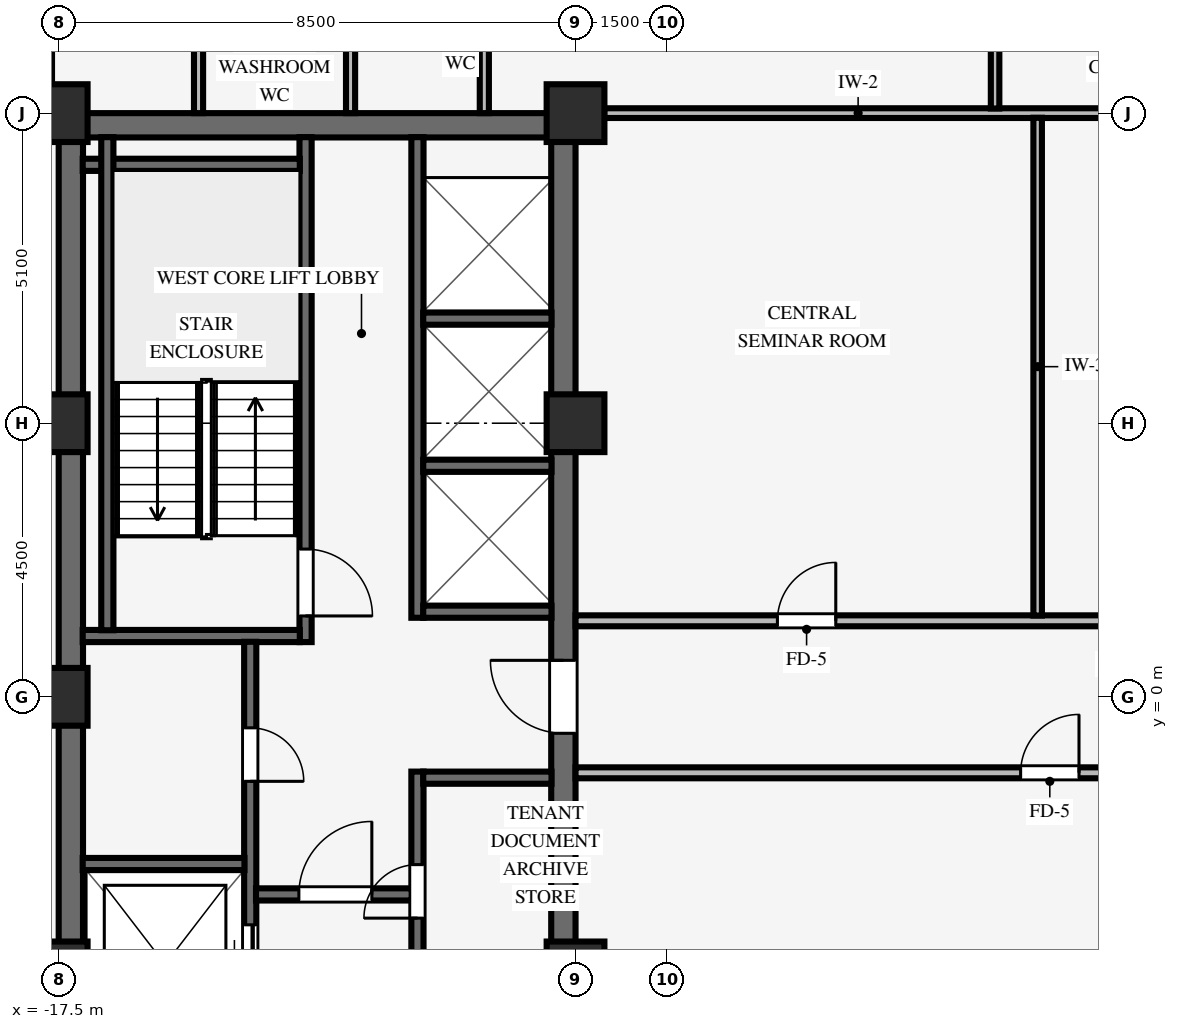
"""IFC4 building model, lengths in metres.
Left out: names, types, materials, properties, quantities, classifications, styles, units other than length and angle.
Written with IfcOpenShell. Run it as: python <this file> out.ifc"""

import sys

from ifc_helpers import new_model, si_unit, direction, frame, frame_2d, origin, origin_2d, place, context, subcontext, project, spatial, rectangle, extrude, source, transform, mapped, element, fill, save


model = new_model("IFC4")
c1 = context("Model", 3, precision=1e-05, world=origin(), true_north=direction((0.0, 1.0)))
c2 = subcontext(c1, "Body", "Model", "MODEL_VIEW")
j1 = project(units=[si_unit("LENGTHUNIT", "METRE"), si_unit("PLANEANGLEUNIT", "RADIAN")], contexts=[c1])
p1 = place(None, origin())
s1 = spatial("IfcSite", under=j1, at=p1, CompositionType="ELEMENT")
p2 = place(p1, origin())
s2 = spatial("IfcBuilding", under=s1, at=p2, CompositionType="ELEMENT")
p3 = place(p2, frame((0.0, 0.0, 160.35)))
s3 = spatial("IfcBuildingStorey", under=s2, at=p3, CompositionType="ELEMENT", Elevation=160.35)
p4 = place(p3, frame((-17.5, 9.4, 0.0), z_axis=(0.0, 0.0, 1.0), x_axis=(1.0, 0.0, 0.0)))
e1 = element("IfcWall", 1, at=p4, inside=s3, PredefinedType="SHEAR", context=c2, shape_type="SweptSolid", body=[
    extrude(rectangle(XDim=8.5, YDim=0.4, at=frame_2d((4.25, 0.0))), origin(), (0.0, 0.0, 1.0), 3.37),
])
p5 = place(p3, frame((-17.3, -9.205, 0.0), z_axis=(0.0, 0.0, 1.0), x_axis=(0.0, 1.0, 0.0)))
e2 = element("IfcWall", 2, at=p5, inside=s3, PredefinedType="SHEAR", context=c2, shape_type="SweptSolid", body=[
    extrude(rectangle(XDim=18.41, YDim=0.4, at=frame_2d((9.205, 0.0))), origin(), (0.0, 0.0, 1.0), 3.37),
])
p6 = place(p3, frame((-9.2, -9.205, 0.0), z_axis=(0.0, 0.0, 1.0), x_axis=(0.0, 1.0, 0.0)))
e3 = element("IfcWall", 3, at=p6, inside=s3, PredefinedType="SHEAR", context=c2, shape_type="SweptSolid", body=[
    extrude(rectangle(XDim=18.41, YDim=0.4, at=frame_2d((9.205, 0.0))), origin(), (0.0, 0.0, 1.0), 3.37),
])
p7 = place(p6, frame((8.605, 0.0, 0.0)))
e4 = element("IfcOpeningElement", 4, at=p7, cuts=e3, PredefinedType="OPENING", context=c2, shape_type="SweptSolid", body=[
    extrude(rectangle(XDim=1.2, YDim=2.15, at=frame_2d((0.6, 1.075))), frame((0.0, 0.21, 0.0), z_axis=(0.0, -1.0, 0.0), x_axis=(1.0, 0.0, 0.0)), (0.0, 0.0, 1.0), 0.42),
])
for number, where, z_axis, x_axis in (
    (5, (-17.5, -4.5, 0.0), (0.0, 0.0, 1.0), (1.0, 0.0, 0.0)),
    (6, (-17.5, 4.5, 0.0), (0.0, 0.0, 1.0), (1.0, 0.0, 0.0)),
    (7, (-17.5, 9.6, 0.0), (0.0, 0.0, 1.0), (1.0, 0.0, 0.0)),
    (8, (-9.0, -4.5, 0.0), (0.0, 0.0, 1.0), (1.0, 0.0, 0.0)),
    (9, (-9.0, 4.5, 0.0), (0.0, 0.0, 1.0), (1.0, 0.0, 0.0)),
    (10, (-9.0, 9.6, 0.0), (0.0, 0.0, 1.0), (1.0, 0.0, 0.0)),
    (11, (-17.5, 0.0, 0.0), (0.0, 0.0, 1.0), (1.0, 0.0, 0.0)),
):
    element("IfcColumn", number, at=place(p3, frame(where, z_axis=z_axis, x_axis=x_axis)), inside=s3, PredefinedType="COLUMN", context=c2, shape_type="SweptSolid", body=[
        extrude(rectangle(XDim=0.95, YDim=0.95, at=origin_2d()), origin(), (0.0, 0.0, 1.0), 3.37),
    ])
p8 = place(p3, frame((-13.44, 0.9, 0.0), z_axis=(0.0, 0.0, 1.0), x_axis=(0.0, 1.0, 0.0)))
e12 = element("IfcWall", 12, at=p8, inside=s3, PredefinedType="SHEAR", context=c2, shape_type="SweptSolid", body=[
    extrude(rectangle(XDim=8.305, YDim=0.2, at=frame_2d((4.153, 0.0))), origin(), (0.0, 0.0, 1.0), 3.37),
])
p9 = place(p8, frame((1.53, 0.0, 0.0), z_axis=(0.0, 0.0, 1.0), x_axis=(-1.0, 0.0, 0.0)))
e13 = element("IfcOpeningElement", 13, at=p9, cuts=e12, PredefinedType="OPENING", context=c2, shape_type="SweptSolid", body=[
    extrude(rectangle(XDim=1.1, YDim=2.15, at=frame_2d((0.55, 1.075))), frame((0.0, 0.11, 0.0), z_axis=(0.0, -1.0, 0.0), x_axis=(1.0, 0.0, 0.0)), (0.0, 0.0, 1.0), 0.22),
])
for number, where, z_axis, x_axis in (
    (14, (-17.105, 1.0, 0.0), (0.0, 0.0, 1.0), (1.0, 0.0, 0.0)),
    (15, (-17.105, 8.75, 0.0), (0.0, 0.0, 1.0), (1.0, 0.0, 0.0)),
):
    element("IfcWall", number, at=place(p3, frame(where, z_axis=z_axis, x_axis=x_axis)), inside=s3, PredefinedType="SHEAR", context=c2, shape_type="SweptSolid", body=[
        extrude(rectangle(XDim=3.57, YDim=0.2, at=frame_2d((1.785, 0.0))), origin(), (0.0, 0.0, 1.0), 3.37),
    ])
p10 = place(p3, frame((-16.7, 1.095, 0.0), z_axis=(0.0, 0.0, 1.0), x_axis=(0.0, 1.0, 0.0)))
e16 = element("IfcWall", 16, at=p10, inside=s3, PredefinedType="SHEAR", context=c2, shape_type="SweptSolid", body=[
    extrude(rectangle(XDim=8.11, YDim=0.2, at=frame_2d((4.055, 0.0))), origin(), (0.0, 0.0, 1.0), 3.37),
])
p11 = place(p3, frame((-14.35, -6.2, 0.0), z_axis=(0.0, 0.0, 1.0), x_axis=(0.0, 1.0, 0.0)))
e17 = element("IfcWall", 17, at=p11, inside=s3, PredefinedType="SHEAR", context=c2, shape_type="SweptSolid", body=[
    extrude(rectangle(XDim=7.105, YDim=0.2, at=frame_2d((3.552, 0.0))), origin(), (0.0, 0.0, 1.0), 3.37),
])
p12 = place(p11, frame((5.69, 0.0, 0.0), z_axis=(0.0, 0.0, 1.0), x_axis=(-1.0, 0.0, 0.0)))
e18 = element("IfcOpeningElement", 18, at=p12, cuts=e17, PredefinedType="OPENING", context=c2, shape_type="SweptSolid", body=[
    extrude(rectangle(XDim=0.88, YDim=2.1, at=frame_2d((0.44, 1.05))), frame((0.0, 0.11, 0.0), z_axis=(0.0, -1.0, 0.0), x_axis=(1.0, 0.0, 0.0)), (0.0, 0.0, 1.0), 0.22),
])
p13 = place(p11, frame((1.15, 0.0, 0.0)))
e19 = element("IfcOpeningElement", 19, at=p13, cuts=e17, PredefinedType="OPENING", context=c2, shape_type="SweptSolid", body=[
    extrude(rectangle(XDim=1.3, YDim=2.2, at=frame_2d((0.65, 1.1))), frame((0.0, 0.11, 0.0), z_axis=(0.0, -1.0, 0.0), x_axis=(1.0, 0.0, 0.0)), (0.0, 0.0, 1.0), 0.22),
])
p14 = place(p3, frame((-17.105, -2.75, 0.0), z_axis=(0.0, 0.0, 1.0), x_axis=(1.0, 0.0, 0.0)))
e20 = element("IfcWall", 20, at=p14, inside=s3, PredefinedType="SHEAR", context=c2, shape_type="SweptSolid", body=[
    extrude(rectangle(XDim=2.66, YDim=0.2, at=frame_2d((1.33, 0.0))), origin(), (0.0, 0.0, 1.0), 3.37),
])
p15 = place(p3, frame((-11.6, -9.205, 0.0), z_axis=(0.0, 0.0, 1.0), x_axis=(0.0, 1.0, 0.0)))
e21 = element("IfcWall", 21, at=p15, inside=s3, PredefinedType="SHEAR", context=c2, shape_type="SweptSolid", body=[
    extrude(rectangle(XDim=7.975, YDim=0.2, at=frame_2d((3.988, 0.0))), origin(), (0.0, 0.0, 1.0), 3.37),
])
p16 = place(p15, frame((1.565, 0.0, 0.0)))
e22 = element("IfcOpeningElement", 22, at=p16, cuts=e21, PredefinedType="OPENING", context=c2, shape_type="SweptSolid", body=[
    extrude(rectangle(XDim=0.88, YDim=2.1, at=frame_2d((0.44, 1.05))), frame((0.0, 0.11, 0.0), z_axis=(0.0, -1.0, 0.0), x_axis=(1.0, 0.0, 0.0)), (0.0, 0.0, 1.0), 0.22),
])
p17 = place(p15, frame((5.565, 0.0, 0.0)))
e23 = element("IfcOpeningElement", 23, at=p17, cuts=e21, PredefinedType="OPENING", context=c2, shape_type="SweptSolid", body=[
    extrude(rectangle(XDim=0.88, YDim=2.1, at=frame_2d((0.44, 1.05))), frame((0.0, 0.11, 0.0), z_axis=(0.0, -1.0, 0.0), x_axis=(1.0, 0.0, 0.0)), (0.0, 0.0, 1.0), 0.22),
])
p18 = place(p3, frame((-14.255, -3.25, 0.0), z_axis=(0.0, 0.0, 1.0), x_axis=(1.0, 0.0, 0.0)))
e24 = element("IfcWall", 24, at=p18, inside=s3, PredefinedType="SHEAR", context=c2, shape_type="SweptSolid", body=[
    extrude(rectangle(XDim=2.56, YDim=0.2, at=frame_2d((1.28, 0.0))), origin(), (0.0, 0.0, 1.0), 3.37),
])
p19 = place(p18, frame((0.705, 0.0, 0.0)))
e25 = element("IfcOpeningElement", 25, at=p19, cuts=e24, PredefinedType="OPENING", context=c2, shape_type="SweptSolid", body=[
    extrude(rectangle(XDim=1.2, YDim=2.15, at=frame_2d((0.6, 1.075))), frame((0.0, 0.11, 0.0), z_axis=(0.0, -1.0, 0.0), x_axis=(1.0, 0.0, 0.0)), (0.0, 0.0, 1.0), 0.22),
])
p20 = place(p3, frame((-11.505, -1.33, 0.0), z_axis=(0.0, 0.0, 1.0), x_axis=(1.0, 0.0, 0.0)))
e26 = element("IfcWall", 26, at=p20, inside=s3, PredefinedType="SHEAR", context=c2, shape_type="SweptSolid", body=[
    extrude(rectangle(XDim=2.11, YDim=0.2, at=frame_2d((1.055, 0.0))), origin(), (0.0, 0.0, 1.0), 3.37),
])
p21 = place(p3, frame((-11.6, 1.3, 0.0), z_axis=(0.0, 0.0, 1.0), x_axis=(0.0, 1.0, 0.0)))
e27 = element("IfcWall", 27, at=p21, inside=s3, PredefinedType="SHEAR", context=c2, shape_type="SweptSolid", body=[
    extrude(rectangle(XDim=7.905, YDim=0.2, at=frame_2d((3.953, 0.0))), origin(), (0.0, 0.0, 1.0), 3.37),
])
for number, where, z_axis, x_axis in (
    (28, (-11.505, 1.4, 0.0), (0.0, 0.0, 1.0), (1.0, 0.0, 0.0)),
    (29, (-11.505, 3.8, 0.0), (0.0, 0.0, 1.0), (1.0, 0.0, 0.0)),
    (30, (-11.505, 6.22, 0.0), (0.0, 0.0, 1.0), (1.0, 0.0, 0.0)),
):
    element("IfcWall", number, at=place(p3, frame(where, z_axis=z_axis, x_axis=x_axis)), inside=s3, PredefinedType="SHEAR", context=c2, shape_type="SweptSolid", body=[
        extrude(rectangle(XDim=2.11, YDim=0.2, at=frame_2d((1.055, 0.0))), origin(), (0.0, 0.0, 1.0), 3.37),
    ])
p22 = place(p3, frame((-9.0, -1.25, 0.0), z_axis=(0.0, 0.0, 1.0), x_axis=(1.0, 0.0, 0.0)))
e31 = element("IfcWall", 31, at=p22, inside=s3, PredefinedType="PARTITIONING", context=c2, shape_type="SweptSolid", body=[
    extrude(rectangle(XDim=15.6, YDim=0.18, at=frame_2d((7.8, 0.0))), origin(), (0.0, 0.0, 1.0), 3.36),
])
p23 = place(p22, frame((7.32, 0.0, 0.0)))
e32 = element("IfcOpeningElement", 32, at=p23, cuts=e31, PredefinedType="OPENING", context=c2, shape_type="SweptSolid", body=[
    extrude(rectangle(XDim=0.96, YDim=2.1, at=frame_2d((0.48, 1.05))), frame((0.0, 0.1, 0.0), z_axis=(0.0, -1.0, 0.0), x_axis=(1.0, 0.0, 0.0)), (0.0, 0.0, 1.0), 0.2),
])
p24 = place(p3, frame((-9.0, 1.25, 0.0), z_axis=(0.0, 0.0, 1.0), x_axis=(1.0, 0.0, 0.0)))
e33 = element("IfcWall", 33, at=p24, inside=s3, PredefinedType="PARTITIONING", context=c2, shape_type="SweptSolid", body=[
    extrude(rectangle(XDim=15.6, YDim=0.18, at=frame_2d((7.8, 0.0))), origin(), (0.0, 0.0, 1.0), 3.36),
])
p25 = place(p24, frame((3.32, 0.0, 0.0)))
e34 = element("IfcOpeningElement", 34, at=p25, cuts=e33, PredefinedType="OPENING", context=c2, shape_type="SweptSolid", body=[
    extrude(rectangle(XDim=0.96, YDim=2.1, at=frame_2d((0.48, 1.05))), frame((0.0, 0.1, 0.0), z_axis=(0.0, -1.0, 0.0), x_axis=(1.0, 0.0, 0.0)), (0.0, 0.0, 1.0), 0.2),
])
p26 = place(p3, frame((-8.529, 9.6, 0.0), z_axis=(0.0, 0.0, 1.0), x_axis=(1.0, 0.0, 0.0)))
e35 = element("IfcWall", 35, at=p26, inside=s3, PredefinedType="PARTITIONING", context=c2, shape_type="SweptSolid", body=[
    extrude(rectangle(XDim=8.353, YDim=0.16, at=frame_2d((4.177, 0.0))), origin(), (0.0, 0.0, 1.0), 2.405),
])
for number, where, z_axis, x_axis in (
    (36, (-15.2, 9.6, 0.0), (0.0, 0.0, 1.0), (0.0, 1.0, 0.0)),
    (37, (-12.7, 9.6, 0.0), (0.0, 0.0, 1.0), (0.0, 1.0, 0.0)),
    (38, (-10.5, 9.6, 0.0), (0.0, 0.0, 1.0), (0.0, 1.0, 0.0)),
):
    element("IfcWall", number, at=place(p3, frame(where, z_axis=z_axis, x_axis=x_axis)), inside=s3, PredefinedType="PARTITIONING", context=c2, shape_type="SweptSolid", body=[
        extrude(rectangle(XDim=3.814, YDim=0.15, at=frame_2d((1.907, 0.0))), origin(), (0.0, 0.0, 1.0), 3.36),
    ])
p27 = place(p3, frame((-2.1, 9.676, 0.0), z_axis=(0.0, 0.0, 1.0), x_axis=(0.0, 1.0, 0.0)))
e39 = element("IfcWall", 39, at=p27, inside=s3, PredefinedType="PARTITIONING", context=c2, shape_type="SweptSolid", body=[
    extrude(rectangle(XDim=3.738, YDim=0.14, at=frame_2d((1.869, 0.0))), origin(), (0.0, 0.0, 1.0), 3.36),
])
p28 = place(p3, frame((-1.4, 1.336, 0.0), z_axis=(0.0, 0.0, 1.0), x_axis=(0.0, 1.0, 0.0)))
e40 = element("IfcWall", 40, at=p28, inside=s3, PredefinedType="PARTITIONING", context=c2, shape_type="SweptSolid", body=[
    extrude(rectangle(XDim=8.188, YDim=0.14, at=frame_2d((4.094, 0.0))), origin(), (0.0, 0.0, 1.0), 3.36),
])
m1 = source(origin(), c2, "Body", "SweptSolid", [
    extrude(rectangle(XDim=1.1, YDim=2.15, at=frame_2d((0.55, 1.075))), frame((0.0, 0.025, 0.0), z_axis=(0.0, -1.0, 0.0), x_axis=(1.0, 0.0, 0.0)), (0.0, 0.0, 1.0), 0.05),
])
p29 = place(p9, origin())
e41 = element("IfcDoor", 41, at=p29, inside=s3, OperationType="SINGLE_SWING_RIGHT", PredefinedType="DOOR", context=c2, shape_type="MappedRepresentation", body=[
    mapped(m1, transform((0.0, 0.0, 0.0), scale=1.0)),
])
fill(e13, e41)
m2 = source(origin(), c2, "Body", "SweptSolid", [
    extrude(rectangle(XDim=0.88, YDim=2.1, at=frame_2d((0.44, 1.05))), frame((0.0, 0.025, 0.0), z_axis=(0.0, -1.0, 0.0), x_axis=(1.0, 0.0, 0.0)), (0.0, 0.0, 1.0), 0.05),
])
p30 = place(p12, origin())
e42 = element("IfcDoor", 42, at=p30, inside=s3, OperationType="SINGLE_SWING_RIGHT", PredefinedType="DOOR", context=c2, shape_type="MappedRepresentation", body=[
    mapped(m2, transform((0.0, 0.0, 0.0), scale=1.0)),
])
fill(e18, e42)
m3 = source(origin(), c2, "Body", "SweptSolid", [
    extrude(rectangle(XDim=1.2, YDim=2.15, at=frame_2d((0.6, 1.075))), frame((0.0, 0.025, 0.0), z_axis=(0.0, -1.0, 0.0), x_axis=(1.0, 0.0, 0.0)), (0.0, 0.0, 1.0), 0.05),
])
p31 = place(p19, origin())
e43 = element("IfcDoor", 43, at=p31, inside=s3, OperationType="SINGLE_SWING_RIGHT", PredefinedType="DOOR", context=c2, shape_type="MappedRepresentation", body=[
    mapped(m3, transform((0.0, 0.0, 0.0), scale=1.0)),
])
fill(e25, e43)
p32 = place(p17, origin())
e44 = element("IfcDoor", 44, at=p32, inside=s3, OperationType="SINGLE_SWING_LEFT", PredefinedType="DOOR", context=c2, shape_type="MappedRepresentation", body=[
    mapped(m2, transform((0.0, 0.0, 0.0), scale=1.0)),
])
fill(e23, e44)
p33 = place(p7, origin())
e45 = element("IfcDoor", 45, at=p33, inside=s3, OperationType="SINGLE_SWING_RIGHT", PredefinedType="DOOR", context=c2, shape_type="MappedRepresentation", body=[
    mapped(m3, transform((0.0, 0.0, 0.0), scale=1.0)),
])
fill(e4, e45)
m4 = source(origin(), c2, "Body", "SweptSolid", [
    extrude(rectangle(XDim=1.3, YDim=2.2, at=frame_2d((0.65, 1.1))), frame((0.0, 0.025, 0.0), z_axis=(0.0, -1.0, 0.0), x_axis=(1.0, 0.0, 0.0)), (0.0, 0.0, 1.0), 0.05),
])
p34 = place(p13, origin())
e46 = element("IfcDoor", 46, at=p34, inside=s3, OperationType="DOUBLE_DOOR_SLIDING", PredefinedType="DOOR", context=c2, shape_type="MappedRepresentation", body=[
    mapped(m4, transform((0.0, 0.0, 0.0), scale=1.0)),
])
fill(e19, e46)
m5 = source(origin(), c2, "Body", "SweptSolid", [
    extrude(rectangle(XDim=0.96, YDim=2.1, at=frame_2d((0.48, 1.05))), frame((0.0, 0.025, 0.0), z_axis=(0.0, -1.0, 0.0), x_axis=(1.0, 0.0, 0.0)), (0.0, 0.0, 1.0), 0.05),
])
p35 = place(p23, origin())
e47 = element("IfcDoor", 47, at=p35, inside=s3, OperationType="SINGLE_SWING_RIGHT", PredefinedType="DOOR", context=c2, shape_type="MappedRepresentation", body=[
    mapped(m5, transform((0.0, 0.0, 0.0), scale=1.0)),
])
fill(e32, e47)
p36 = place(p25, origin())
e48 = element("IfcDoor", 48, at=p36, inside=s3, OperationType="SINGLE_SWING_RIGHT", PredefinedType="DOOR", context=c2, shape_type="MappedRepresentation", body=[
    mapped(m5, transform((0.0, 0.0, 0.0), scale=1.0)),
])
fill(e34, e48)
save(model, sys.argv[1])
